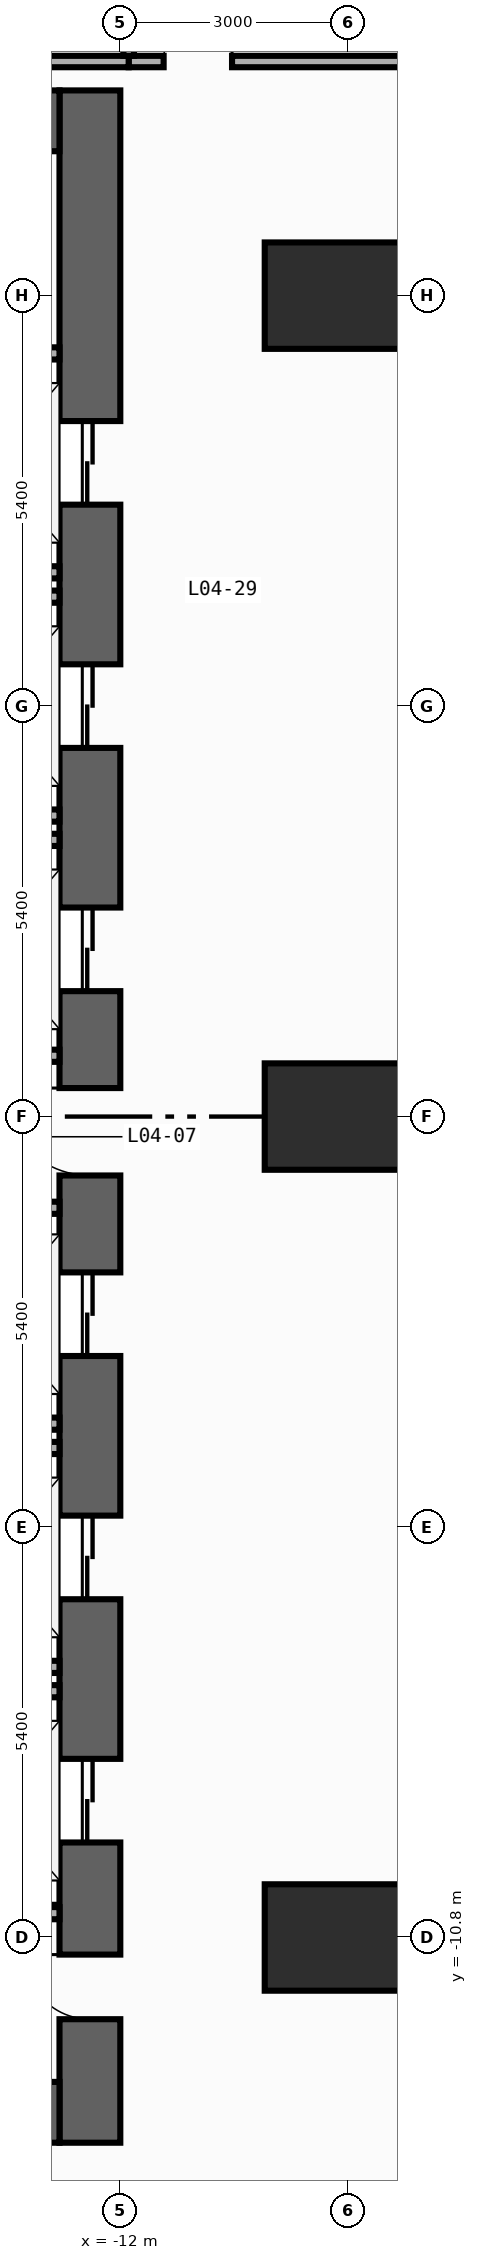
"""IFC4 building model, lengths in metres.
Left out: names, types, materials, properties, quantities, classifications, styles, units other than length and angle.
Written with IfcOpenShell. Run it as: python <this file> out.ifc"""

import sys

from ifc_helpers import new_model, si_unit, direction, frame, frame_2d, origin, origin_2d, place, context, subcontext, project, spatial, rectangle, extrude, element, fill, save


model = new_model("IFC4")
c1 = context("Model", 3, precision=1e-05, world=origin(), true_north=direction((0.0, 1.0)))
c2 = subcontext(c1, "Body", "Model", "MODEL_VIEW")
j1 = project(units=[si_unit("LENGTHUNIT", "METRE"), si_unit("PLANEANGLEUNIT", "RADIAN")], contexts=[c1])
p1 = place(None, origin())
s1 = spatial("IfcSite", under=j1, at=p1, CompositionType="ELEMENT")
p2 = place(p1, origin())
s2 = spatial("IfcBuilding", under=s1, at=p2, CompositionType="ELEMENT")
p3 = place(p2, frame((0.0, 0.0, 16.0)))
s3 = spatial("IfcBuildingStorey", under=s2, at=p3, CompositionType="ELEMENT", Elevation=16.0)
p4 = place(p3, frame((-12.4, -13.5, 0.0), z_axis=(0.0, 0.0, 1.0), x_axis=(0.0, 1.0, 0.0)))
e1 = element("IfcWall", 1, at=p4, inside=s3, PredefinedType="SHEAR", context=c2, shape_type="SweptSolid", body=[
    extrude(rectangle(XDim=27.0, YDim=0.8, at=frame_2d((13.5, 0.0))), origin(), (0.0, 0.0, 1.0), 4.55),
])
p5 = place(p4, frame((21.55, 0.0, 0.0)))
e2 = element("IfcOpeningElement", 2, at=p5, cuts=e1, PredefinedType="OPENING", context=c2, shape_type="SweptSolid", body=[
    extrude(rectangle(XDim=1.1, YDim=2.2, at=frame_2d((0.55, 1.1))), frame((0.0, 0.41, 0.0), z_axis=(0.0, -1.0, 0.0), x_axis=(1.0, 0.0, 0.0)), (0.0, 0.0, 1.0), 0.82),
])
p6 = place(p4, frame((18.35, 0.0, 0.0)))
e3 = element("IfcOpeningElement", 3, at=p6, cuts=e1, PredefinedType="OPENING", context=c2, shape_type="SweptSolid", body=[
    extrude(rectangle(XDim=1.1, YDim=2.2, at=frame_2d((0.55, 1.1))), frame((0.0, 0.41, 0.0), z_axis=(0.0, -1.0, 0.0), x_axis=(1.0, 0.0, 0.0)), (0.0, 0.0, 1.0), 0.82),
])
p7 = place(p4, frame((15.15, 0.0, 0.0)))
e4 = element("IfcOpeningElement", 4, at=p7, cuts=e1, PredefinedType="OPENING", context=c2, shape_type="SweptSolid", body=[
    extrude(rectangle(XDim=1.1, YDim=2.2, at=frame_2d((0.55, 1.1))), frame((0.0, 0.41, 0.0), z_axis=(0.0, -1.0, 0.0), x_axis=(1.0, 0.0, 0.0)), (0.0, 0.0, 1.0), 0.82),
])
p8 = place(p4, frame((10.35, 0.0, 0.0)))
e5 = element("IfcOpeningElement", 5, at=p8, cuts=e1, PredefinedType="OPENING", context=c2, shape_type="SweptSolid", body=[
    extrude(rectangle(XDim=1.1, YDim=2.2, at=frame_2d((0.55, 1.1))), frame((0.0, 0.41, 0.0), z_axis=(0.0, -1.0, 0.0), x_axis=(1.0, 0.0, 0.0)), (0.0, 0.0, 1.0), 0.82),
])
p9 = place(p4, frame((7.15, 0.0, 0.0)))
e6 = element("IfcOpeningElement", 6, at=p9, cuts=e1, PredefinedType="OPENING", context=c2, shape_type="SweptSolid", body=[
    extrude(rectangle(XDim=1.1, YDim=2.2, at=frame_2d((0.55, 1.1))), frame((0.0, 0.41, 0.0), z_axis=(0.0, -1.0, 0.0), x_axis=(1.0, 0.0, 0.0)), (0.0, 0.0, 1.0), 0.82),
])
p10 = place(p4, frame((3.95, 0.0, 0.0)))
e7 = element("IfcOpeningElement", 7, at=p10, cuts=e1, PredefinedType="OPENING", context=c2, shape_type="SweptSolid", body=[
    extrude(rectangle(XDim=1.1, YDim=2.2, at=frame_2d((0.55, 1.1))), frame((0.0, 0.41, 0.0), z_axis=(0.0, -1.0, 0.0), x_axis=(1.0, 0.0, 0.0)), (0.0, 0.0, 1.0), 0.82),
])
p11 = place(p4, frame((12.725, 0.0, 0.0)))
e8 = element("IfcOpeningElement", 8, at=p11, cuts=e1, PredefinedType="OPENING", context=c2, shape_type="SweptSolid", body=[
    extrude(rectangle(XDim=1.15, YDim=2.2, at=frame_2d((0.575, 1.1))), frame((0.0, 0.41, 0.0), z_axis=(0.0, -1.0, 0.0), x_axis=(1.0, 0.0, 0.0)), (0.0, 0.0, 1.0), 0.82),
])
p12 = place(p4, frame((1.625, 0.0, 0.0)))
e9 = element("IfcOpeningElement", 9, at=p12, cuts=e1, PredefinedType="OPENING", context=c2, shape_type="SweptSolid", body=[
    extrude(rectangle(XDim=0.85, YDim=2.1, at=frame_2d((0.425, 1.05))), frame((0.0, 0.41, 0.0), z_axis=(0.0, -1.0, 0.0), x_axis=(1.0, 0.0, 0.0)), (0.0, 0.0, 1.0), 0.82),
])
for number, where, z_axis, x_axis in (
    (10, (-19.6, -13.1, 0.0), (0.0, 0.0, 1.0), (1.0, 0.0, 0.0)),
    (11, (-19.6, 13.1, 0.0), (0.0, 0.0, 1.0), (1.0, 0.0, 0.0)),
):
    element("IfcWall", number, at=place(p3, frame(where, z_axis=z_axis, x_axis=x_axis)), inside=s3, PredefinedType="SHEAR", context=c2, shape_type="SweptSolid", body=[
        extrude(rectangle(XDim=6.8, YDim=0.8, at=frame_2d((3.4, 0.0))), origin(), (0.0, 0.0, 1.0), 4.55),
    ])
for number, where, z_axis, x_axis in (
    (12, (-9.2, -10.8, 0.0), (0.0, 0.0, 1.0), (1.0, 0.0, 0.0)),
    (13, (-9.2, 0.0, 0.0), (0.0, 0.0, 1.0), (1.0, 0.0, 0.0)),
    (14, (-9.2, 10.8, 0.0), (0.0, 0.0, 1.0), (1.0, 0.0, 0.0)),
):
    element("IfcColumn", number, at=place(p3, frame(where, z_axis=z_axis, x_axis=x_axis)), inside=s3, PredefinedType="COLUMN", context=c2, shape_type="SweptSolid", body=[
        extrude(rectangle(XDim=1.8, YDim=1.4, at=origin_2d()), origin(), (0.0, 0.0, 1.0), 5.0),
    ])
for number, where, z_axis, x_axis in (
    (15, (-14.99, 7.16, 0.0), (0.0, 0.0, 1.0), (1.0, 0.0, 0.0)),
    (16, (-14.99, 10.04, 0.0), (0.0, 0.0, 1.0), (1.0, 0.0, 0.0)),
    (17, (-14.99, 3.96, 0.0), (0.0, 0.0, 1.0), (1.0, 0.0, 0.0)),
    (18, (-14.99, 6.84, 0.0), (0.0, 0.0, 1.0), (1.0, 0.0, 0.0)),
    (19, (-14.99, 3.64, 0.0), (0.0, 0.0, 1.0), (1.0, 0.0, 0.0)),
    (20, (-14.99, -4.04, 0.0), (0.0, 0.0, 1.0), (1.0, 0.0, 0.0)),
    (21, (-14.99, -7.24, 0.0), (0.0, 0.0, 1.0), (1.0, 0.0, 0.0)),
    (22, (-14.99, -4.36, 0.0), (0.0, 0.0, 1.0), (1.0, 0.0, 0.0)),
    (23, (-14.99, -7.56, 0.0), (0.0, 0.0, 1.0), (1.0, 0.0, 0.0)),
):
    element("IfcWall", number, at=place(p3, frame(where, z_axis=z_axis, x_axis=x_axis)), inside=s3, PredefinedType="STANDARD", context=c2, shape_type="SweptSolid", body=[
        extrude(rectangle(XDim=2.19, YDim=0.16, at=frame_2d((1.095, 0.0))), origin(), (0.0, 0.0, 1.0), 4.55),
    ])
for number, where, z_axis, x_axis in (
    (24, (-15.4, 0.8, 0.0), (0.0, 0.0, 1.0), (1.0, 0.0, 0.0)),
    (25, (-15.4, -1.2, 0.0), (0.0, 0.0, 1.0), (1.0, 0.0, 0.0)),
    (26, (-15.4, -10.48, 0.0), (0.0, 0.0, 1.0), (1.0, 0.0, 0.0)),
):
    element("IfcWall", number, at=place(p3, frame(where, z_axis=z_axis, x_axis=x_axis)), inside=s3, PredefinedType="STANDARD", context=c2, shape_type="SweptSolid", body=[
        extrude(rectangle(XDim=2.6, YDim=0.16, at=frame_2d((1.3, 0.0))), origin(), (0.0, 0.0, 1.0), 4.55),
    ])
p13 = place(p3, frame((-11.89, 13.88, 0.0), z_axis=(0.0, 0.0, 1.0), x_axis=(1.0, 0.0, 0.0)))
e27 = element("IfcWall", 27, at=p13, inside=s3, PredefinedType="PARTITIONING", context=c2, shape_type="SweptSolid", body=[
    extrude(rectangle(XDim=3.685, YDim=0.15, at=frame_2d((1.842, 0.0))), origin(), (0.0, 0.0, 1.0), 4.55),
])
p14 = place(p13, frame((0.46, 0.0, 0.0)))
e28 = element("IfcOpeningElement", 28, at=p14, cuts=e27, PredefinedType="OPENING", context=c2, shape_type="SweptSolid", body=[
    extrude(rectangle(XDim=0.9, YDim=2.15, at=frame_2d((0.45, 1.075))), frame((0.0, 0.085, 0.0), z_axis=(0.0, -1.0, 0.0), x_axis=(1.0, 0.0, 0.0)), (0.0, 0.0, 1.0), 0.17),
])
p15 = place(p3, frame((-24.445, 13.88, 0.0), z_axis=(0.0, 0.0, 1.0), x_axis=(1.0, 0.0, 0.0)))
e29 = element("IfcWall", 29, at=p15, inside=s3, PredefinedType="PARTITIONING", context=c2, shape_type="SweptSolid", body=[
    extrude(rectangle(XDim=12.555, YDim=0.15, at=frame_2d((6.278, 0.0))), origin(), (0.0, 0.0, 1.0), 4.55),
])
p16 = place(p15, frame((0.46, 0.0, 0.0)))
e30 = element("IfcOpeningElement", 30, at=p16, cuts=e29, PredefinedType="OPENING", context=c2, shape_type="SweptSolid", body=[
    extrude(rectangle(XDim=0.9, YDim=2.15, at=frame_2d((0.45, 1.075))), frame((0.0, 0.085, 0.0), z_axis=(0.0, -1.0, 0.0), x_axis=(1.0, 0.0, 0.0)), (0.0, 0.0, 1.0), 0.17),
])
p17 = place(p3, frame((-11.89, 13.955, 0.0), z_axis=(0.0, 0.0, 1.0), x_axis=(0.0, 1.0, 0.0)))
e31 = element("IfcWall", 31, at=p17, inside=s3, PredefinedType="PARTITIONING", context=c2, shape_type="SweptSolid", body=[
    extrude(rectangle(XDim=12.118, YDim=0.14, at=frame_2d((6.059, 0.0))), origin(), (0.0, 0.0, 1.0), 4.55),
])
p18 = place(p5, origin())
e32 = element("IfcDoor", 32, at=p18, inside=s3, OperationType="DOUBLE_DOOR_SLIDING", PredefinedType="DOOR", context=c2, shape_type="SweptSolid", body=[
    extrude(rectangle(XDim=1.1, YDim=2.2, at=frame_2d((0.55, 1.1))), frame((0.0, 0.025, 0.0), z_axis=(0.0, -1.0, 0.0), x_axis=(1.0, 0.0, 0.0)), (0.0, 0.0, 1.0), 0.05),
])
fill(e2, e32)
p19 = place(p6, origin())
e33 = element("IfcDoor", 33, at=p19, inside=s3, OperationType="DOUBLE_DOOR_SLIDING", PredefinedType="DOOR", context=c2, shape_type="SweptSolid", body=[
    extrude(rectangle(XDim=1.1, YDim=2.2, at=frame_2d((0.55, 1.1))), frame((0.0, 0.025, 0.0), z_axis=(0.0, -1.0, 0.0), x_axis=(1.0, 0.0, 0.0)), (0.0, 0.0, 1.0), 0.05),
])
fill(e3, e33)
p20 = place(p7, origin())
e34 = element("IfcDoor", 34, at=p20, inside=s3, OperationType="DOUBLE_DOOR_SLIDING", PredefinedType="DOOR", context=c2, shape_type="SweptSolid", body=[
    extrude(rectangle(XDim=1.1, YDim=2.2, at=frame_2d((0.55, 1.1))), frame((0.0, 0.025, 0.0), z_axis=(0.0, -1.0, 0.0), x_axis=(1.0, 0.0, 0.0)), (0.0, 0.0, 1.0), 0.05),
])
fill(e4, e34)
p21 = place(p8, origin())
e35 = element("IfcDoor", 35, at=p21, inside=s3, OperationType="DOUBLE_DOOR_SLIDING", PredefinedType="DOOR", context=c2, shape_type="SweptSolid", body=[
    extrude(rectangle(XDim=1.1, YDim=2.2, at=frame_2d((0.55, 1.1))), frame((0.0, 0.025, 0.0), z_axis=(0.0, -1.0, 0.0), x_axis=(1.0, 0.0, 0.0)), (0.0, 0.0, 1.0), 0.05),
])
fill(e5, e35)
p22 = place(p9, origin())
e36 = element("IfcDoor", 36, at=p22, inside=s3, OperationType="DOUBLE_DOOR_SLIDING", PredefinedType="DOOR", context=c2, shape_type="SweptSolid", body=[
    extrude(rectangle(XDim=1.1, YDim=2.2, at=frame_2d((0.55, 1.1))), frame((0.0, 0.025, 0.0), z_axis=(0.0, -1.0, 0.0), x_axis=(1.0, 0.0, 0.0)), (0.0, 0.0, 1.0), 0.05),
])
fill(e6, e36)
p23 = place(p10, origin())
e37 = element("IfcDoor", 37, at=p23, inside=s3, OperationType="DOUBLE_DOOR_SLIDING", PredefinedType="DOOR", context=c2, shape_type="SweptSolid", body=[
    extrude(rectangle(XDim=1.1, YDim=2.2, at=frame_2d((0.55, 1.1))), frame((0.0, 0.025, 0.0), z_axis=(0.0, -1.0, 0.0), x_axis=(1.0, 0.0, 0.0)), (0.0, 0.0, 1.0), 0.05),
])
fill(e7, e37)
p24 = place(p11, origin())
e38 = element("IfcDoor", 38, at=p24, inside=s3, OperationType="SINGLE_SWING_RIGHT", PredefinedType="DOOR", context=c2, shape_type="SweptSolid", body=[
    extrude(rectangle(XDim=1.15, YDim=2.2, at=frame_2d((0.575, 1.1))), frame((0.0, 0.025, 0.0), z_axis=(0.0, -1.0, 0.0), x_axis=(1.0, 0.0, 0.0)), (0.0, 0.0, 1.0), 0.05),
])
fill(e8, e38)
p25 = place(p12, origin())
e39 = element("IfcDoor", 39, at=p25, inside=s3, OperationType="SINGLE_SWING_RIGHT", PredefinedType="DOOR", context=c2, shape_type="SweptSolid", body=[
    extrude(rectangle(XDim=0.85, YDim=2.1, at=frame_2d((0.425, 1.05))), frame((0.0, 0.025, 0.0), z_axis=(0.0, -1.0, 0.0), x_axis=(1.0, 0.0, 0.0)), (0.0, 0.0, 1.0), 0.05),
])
fill(e9, e39)
p26 = place(p14, origin())
e40 = element("IfcDoor", 40, at=p26, inside=s3, OperationType="SINGLE_SWING_RIGHT", PredefinedType="DOOR", context=c2, shape_type="SweptSolid", body=[
    extrude(rectangle(XDim=0.9, YDim=2.15, at=frame_2d((0.45, 1.075))), frame((0.0, 0.025, 0.0), z_axis=(0.0, -1.0, 0.0), x_axis=(1.0, 0.0, 0.0)), (0.0, 0.0, 1.0), 0.05),
])
fill(e28, e40)
save(model, sys.argv[1])
